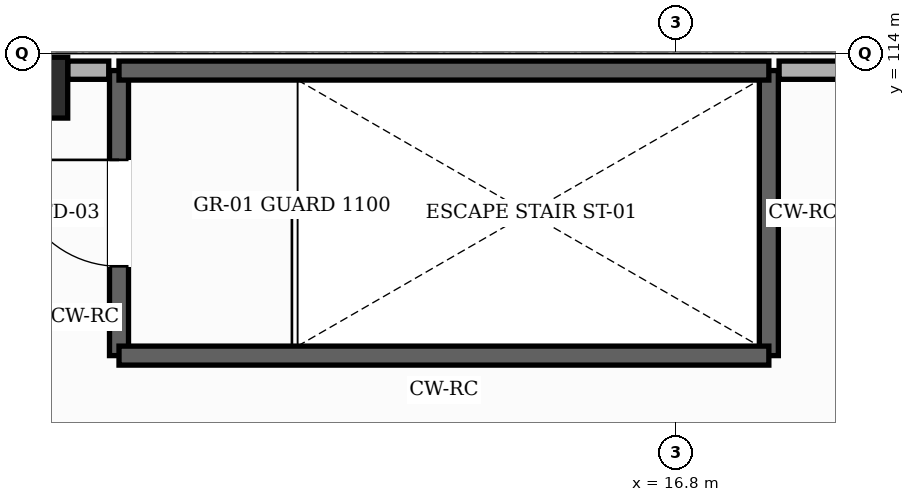
"""IFC4 building model, lengths in metres.
Left out: names, types, materials, properties, quantities, classifications, styles, units other than length and angle.
Written with IfcOpenShell. Run it as: python <this file> out.ifc"""

import sys

from ifc_helpers import new_model, si_unit, direction, frame, frame_2d, origin, origin_2d, place, context, subcontext, project, spatial, rectangle, hollow_rectangle, extrude, element, fill, save


model = new_model("IFC4")
c1 = context("Model", 3, precision=1e-05, world=origin(), true_north=direction((0.0, 1.0)))
c2 = subcontext(c1, "Body", "Model", "MODEL_VIEW")
j1 = project(units=[si_unit("LENGTHUNIT", "METRE"), si_unit("PLANEANGLEUNIT", "RADIAN")], contexts=[c1])
p1 = place(None, origin())
s1 = spatial("IfcSite", under=j1, at=p1, CompositionType="ELEMENT")
p2 = place(p1, origin())
s2 = spatial("IfcBuilding", under=s1, at=p2, CompositionType="ELEMENT")
p3 = place(p2, frame((0.0, 0.0, 15.0)))
s3 = spatial("IfcBuildingStorey", under=s2, at=p3, CompositionType="ELEMENT", Elevation=15.0)
p4 = place(p3, frame((8.4, 113.55, 0.0), z_axis=(0.0, 0.0, 1.0), x_axis=(1.0, 0.0, 0.0)))
e1 = element("IfcColumn", 1, at=p4, inside=s3, PredefinedType="COLUMN", context=c2, shape_type="SweptSolid", body=[
    extrude(hollow_rectangle(XDim=0.8, YDim=0.8, WallThickness=0.032, InnerFilletRadius=0.032, OuterFilletRadius=0.064, at=origin_2d()), origin(), (0.0, 0.0, 1.0), 4.8),
])
p5 = place(p3, frame((8.8, 113.78, 0.0), z_axis=(0.0, 0.0, 1.0), x_axis=(1.0, 0.0, 0.0)))
e2 = element("IfcWall", 2, at=p5, inside=s3, PredefinedType="SOLIDWALL", context=c2, shape_type="SweptSolid", body=[
    extrude(rectangle(XDim=0.54, YDim=0.24, at=frame_2d((0.27, 0.0))), origin(), (0.0, 0.0, 1.0), 4.545),
])
p6 = place(p3, frame((18.16, 113.78, 0.0), z_axis=(0.0, 0.0, 1.0), x_axis=(1.0, 0.0, 0.0)))
e3 = element("IfcWall", 3, at=p6, inside=s3, PredefinedType="SOLIDWALL", context=c2, shape_type="SweptSolid", body=[
    extrude(rectangle(XDim=6.64, YDim=0.24, at=frame_2d((3.32, 0.0))), origin(), (0.0, 0.0, 1.0), 4.545),
])
p7 = place(p3, frame((9.475, 110.025, 0.0), z_axis=(0.0, 0.0, 1.0), x_axis=(0.0, 1.0, 0.0)))
e4 = element("IfcWall", 4, at=p7, inside=s3, PredefinedType="SHEAR", context=c2, shape_type="SweptSolid", body=[
    extrude(rectangle(XDim=3.75, YDim=0.25, at=frame_2d((1.875, 0.0))), origin(), (0.0, 0.0, 1.0), 4.56),
])
p8 = place(p7, frame((1.175, 0.0, 0.0)))
e5 = element("IfcOpeningElement", 5, at=p8, cuts=e4, PredefinedType="OPENING", context=c2, shape_type="SweptSolid", body=[
    extrude(rectangle(XDim=1.4, YDim=2.25, at=frame_2d((0.7, 1.125))), frame((0.0, 0.135, 0.0), z_axis=(0.0, -1.0, 0.0), x_axis=(1.0, 0.0, 0.0)), (0.0, 0.0, 1.0), 0.27),
])
p9 = place(p3, frame((18.025, 113.775, 0.0), z_axis=(0.0, 0.0, 1.0), x_axis=(0.0, -1.0, 0.0)))
e6 = element("IfcWall", 6, at=p9, inside=s3, PredefinedType="SHEAR", context=c2, shape_type="SweptSolid", body=[
    extrude(rectangle(XDim=3.75, YDim=0.25, at=frame_2d((1.875, 0.0))), origin(), (0.0, 0.0, 1.0), 4.56),
])
for number, where, z_axis, x_axis in (
    (7, (18.025, 110.025, 0.0), (0.0, 0.0, 1.0), (-1.0, 0.0, 0.0)),
    (8, (9.475, 113.775, 0.0), (0.0, 0.0, 1.0), (1.0, 0.0, 0.0)),
):
    element("IfcWall", number, at=place(p3, frame(where, z_axis=z_axis, x_axis=x_axis)), inside=s3, PredefinedType="SHEAR", context=c2, shape_type="SweptSolid", body=[
        extrude(rectangle(XDim=8.55, YDim=0.25, at=frame_2d((4.275, 0.0))), origin(), (0.0, 0.0, 1.0), 4.56),
    ])
p10 = place(p8, origin())
e9 = element("IfcDoor", 9, at=p10, inside=s3, OperationType="SINGLE_SWING_RIGHT", PredefinedType="DOOR", context=c2, shape_type="SweptSolid", body=[
    extrude(rectangle(XDim=1.4, YDim=2.25, at=frame_2d((0.7, 1.125))), frame((0.0, 0.025, 0.0), z_axis=(0.0, -1.0, 0.0), x_axis=(1.0, 0.0, 0.0)), (0.0, 0.0, 1.0), 0.05),
])
fill(e5, e9)
save(model, sys.argv[1])
